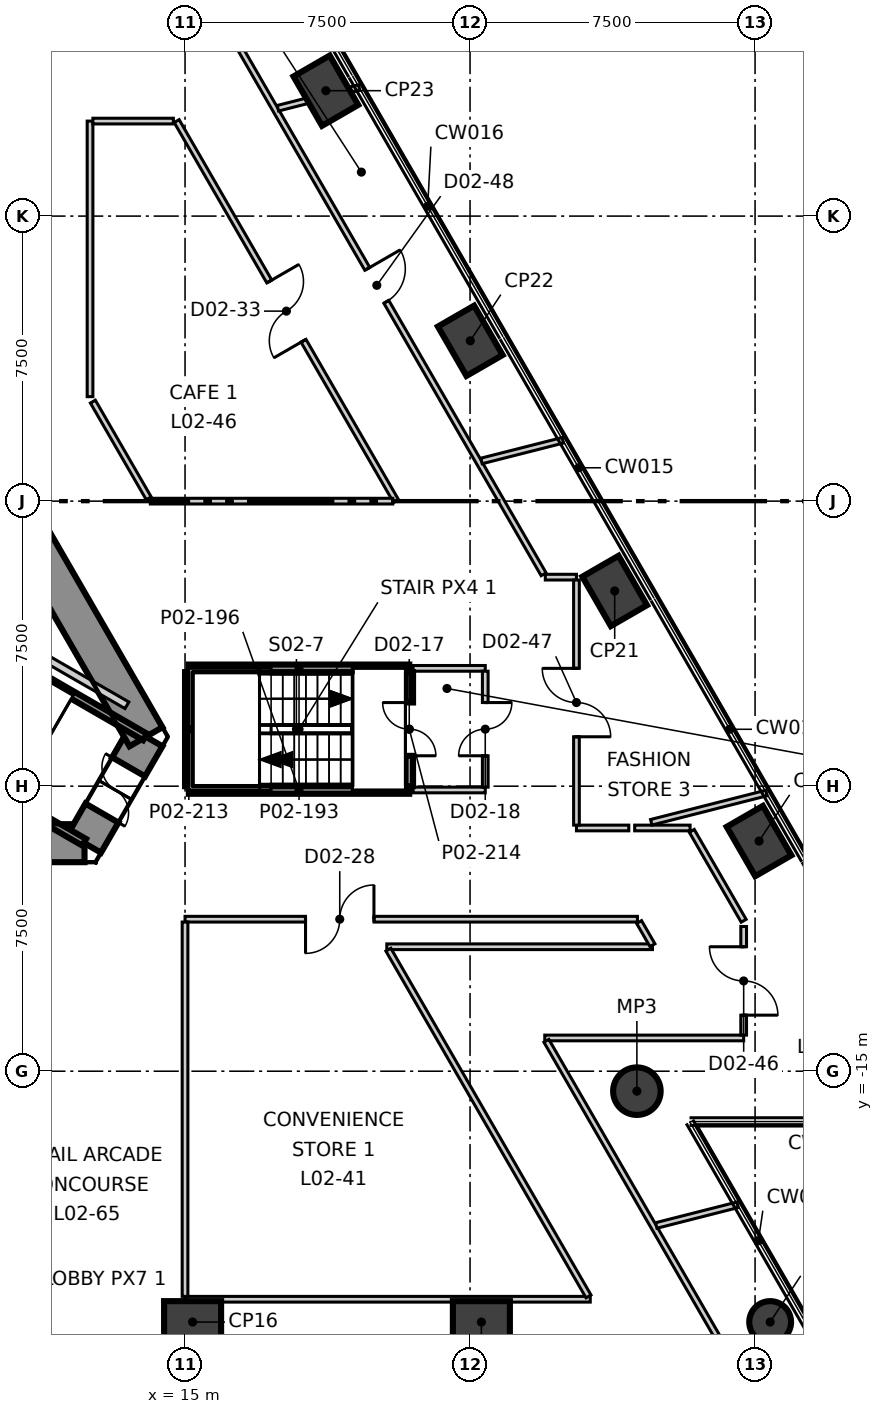
"""IFC4 building model, lengths in metres.
Left out: names, types, materials, properties, quantities, classifications, styles, units other than length and angle.
Written with IfcOpenShell. Run it as: python <this file> out.ifc"""

import sys

from ifc_helpers import new_model, si_unit, direction, frame, frame_2d, origin, origin_2d, place, context, subcontext, project, spatial, polyline, rectangle, circle, outline, extrude, element, fill, save


model = new_model("IFC4")
c1 = context("Model", 3, precision=1e-05, world=origin(), true_north=direction((0.0, 1.0)))
c2 = subcontext(c1, "Body", "Model", "MODEL_VIEW")
j1 = project(units=[si_unit("LENGTHUNIT", "METRE"), si_unit("PLANEANGLEUNIT", "RADIAN")], contexts=[c1])
p1 = place(None, origin())
s1 = spatial("IfcSite", under=j1, at=p1, CompositionType="ELEMENT")
p2 = place(p1, origin())
s2 = spatial("IfcBuilding", under=s1, at=p2, CompositionType="ELEMENT")
p3 = place(p2, frame((0.0, 0.0, 14.5)))
s3 = spatial("IfcBuildingStorey", under=s2, at=p3, CompositionType="ELEMENT", Elevation=14.5)
p4 = place(p3, frame((-12.355, -9.0, -0.4), z_axis=(0.0, 0.0, 1.0), x_axis=(1.0, 0.0, 0.0)))
e1 = element("IfcWall", 1, at=p4, inside=s3, PredefinedType="SHEAR", context=c2, shape_type="SweptSolid", body=[
    extrude(outline(polyline([(-0.289, -0.5), (1.656, -0.5), (3.601, -0.5), (5.547, -0.5), (7.492, -0.5), (9.437, -0.5), (11.382, -0.5), (13.328, -0.5), (15.273, -0.5), (17.218, -0.5), (19.163, -0.5), (21.109, -0.5), (23.054, -0.5), (24.999, -0.5), (24.422, 0.5), (22.566, 0.5), (20.709, 0.5), (18.853, 0.5), (16.996, 0.5), (15.14, 0.5), (13.283, 0.5), (11.427, 0.5), (9.57, 0.5), (7.714, 0.5), (5.857, 0.5), (4.001, 0.5), (2.145, 0.5), (0.288, 0.5), (-0.289, -0.5)])), origin(), (0.0, 0.0, 1.0), 5.4),
])
p5 = place(p3, frame((12.355, -9.0, -0.4), z_axis=(0.0, 0.0, 1.0), x_axis=(0.500077567175, 0.865980615723, 0.0)))
e2 = element("IfcWall", 2, at=p5, inside=s3, PredefinedType="SHEAR", context=c2, shape_type="SweptSolid", body=[
    extrude(outline(polyline([(-0.288, -0.5), (1.617, -0.5), (3.522, -0.5), (2.945, 0.5), (1.617, 0.5), (0.289, 0.499), (-0.288, -0.5)])), origin(), (0.0, 0.0, 1.0), 5.4),
])
p6 = place(p5, frame((0.917, 0.0, 0.4)))
e3 = element("IfcOpeningElement", 3, at=p6, cuts=e2, PredefinedType="OPENING", context=c2, shape_type="SweptSolid", body=[
    extrude(rectangle(XDim=1.4, YDim=2.1, at=frame_2d((0.7, 1.05))), frame((0.0, 0.51, 0.0), z_axis=(0.0, -1.0, 0.0), x_axis=(1.0, 0.0, 0.0)), (0.0, 0.0, 1.0), 1.02),
])
p7 = place(p3, frame((13.972, -6.2, -0.4), z_axis=(0.0, 0.0, 1.0), x_axis=(-0.499992141631, 0.866029940768, 0.0)))
e4 = element("IfcWall", 4, at=p7, inside=s3, PredefinedType="SHEAR", context=c2, shape_type="SweptSolid", body=[
    extrude(outline(polyline([(-0.288, -0.5), (1.657, -0.5), (3.602, -0.5), (5.547, -0.5), (7.493, -0.5), (9.438, -0.5), (11.383, -0.5), (13.328, -0.5), (15.273, -0.5), (17.218, -0.499), (19.164, -0.499), (21.109, -0.499), (23.054, -0.499), (24.999, -0.499), (24.422, 0.5), (22.566, 0.5), (20.709, 0.5), (18.853, 0.5), (16.996, 0.5), (15.14, 0.5), (13.283, 0.5), (11.427, 0.5), (9.57, 0.5), (7.714, 0.5), (5.857, 0.5), (4.001, 0.5), (2.145, 0.5), (0.288, 0.5), (-0.288, -0.5)])), origin(), (0.0, 0.0, 1.0), 5.4),
])
p8 = place(p7, frame((11.455, 0.0, 0.4)))
e5 = element("IfcOpeningElement", 5, at=p8, cuts=e4, PredefinedType="OPENING", context=c2, shape_type="SweptSolid", body=[
    extrude(rectangle(XDim=1.8, YDim=2.1, at=frame_2d((0.9, 1.05))), frame((0.0, 0.51, 0.0), z_axis=(0.0, -1.0, 0.0), x_axis=(1.0, 0.0, 0.0)), (0.0, 0.0, 1.0), 1.02),
])
for number, where, z_axis, x_axis in (
    (6, (15.199, -21.6, -0.4), (0.0, 0.0, 1.0), (1.0, 0.0, 0.0)),
    (7, (22.798, -21.6, -0.4), (0.0, 0.0, 1.0), (1.0, 0.0, 0.0)),
):
    element("IfcColumn", number, at=place(p3, frame(where, z_axis=z_axis, x_axis=x_axis)), inside=s3, PredefinedType="COLUMN", context=c2, shape_type="SweptSolid", body=[
        extrude(rectangle(XDim=1.5, YDim=1.1, at=origin_2d()), origin(), (0.0, 0.0, 1.0), 5.4),
    ])
p9 = place(p3, frame((30.397, -21.6, -0.4), z_axis=(0.0, 0.0, 1.0), x_axis=(1.0, 0.0, 0.0)))
e8 = element("IfcColumn", 8, at=p9, inside=s3, PredefinedType="COLUMN", context=c2, shape_type="SweptSolid", body=[
    extrude(circle(Radius=0.55, at=origin_2d()), origin(), (0.0, 0.0, 1.0), 5.4),
])
for number, where, z_axis, x_axis in (
    (9, (30.105, -8.944, -0.4), (0.0, 0.0, 1.0), (-0.5, 0.866, 0.0)),
    (10, (26.306, -2.363, -0.4), (0.0, 0.0, 1.0), (-0.5, 0.866, 0.0)),
    (11, (22.506, 4.219, -0.4), (0.0, 0.0, 1.0), (-0.5, 0.866, 0.0)),
    (12, (18.706, 10.8, -0.4), (0.0, 0.0, 1.0), (-0.5, 0.866, 0.0)),
):
    element("IfcColumn", number, at=place(p3, frame(where, z_axis=z_axis, x_axis=x_axis)), inside=s3, PredefinedType="COLUMN", context=c2, shape_type="SweptSolid", body=[
        extrude(rectangle(XDim=1.5, YDim=1.1, at=origin_2d()), origin(), (0.0, 0.0, 1.0), 5.4),
    ])
p10 = place(p3, frame((26.89, -15.525, -0.4), z_axis=(0.0, 0.0, 1.0), x_axis=(1.0, 0.0, 0.0)))
e13 = element("IfcColumn", 13, at=p10, inside=s3, PredefinedType="COLUMN", context=c2, shape_type="SweptSolid", body=[
    extrude(circle(Radius=0.625, at=origin_2d()), origin(), (0.0, 0.0, 1.0), 5.4),
])
for number, where, z_axis, x_axis in (
    (14, (21.0, -7.6, 0.0), (0.0, 0.0, 1.0), (1.0, 0.0, 0.0)),
    (15, (21.0, -4.4, 0.0), (0.0, 0.0, 1.0), (1.0, 0.0, 0.0)),
):
    element("IfcWall", number, at=place(p3, frame(where, z_axis=z_axis, x_axis=x_axis)), inside=s3, PredefinedType="PARTITIONING", context=c2, shape_type="SweptSolid", body=[
        extrude(rectangle(XDim=1.9, YDim=0.15, at=frame_2d((0.95, 0.0))), origin(), (0.0, 0.0, 1.0), 5.0),
    ])
p11 = place(p3, frame((22.9, -7.525, 0.0), z_axis=(0.0, 0.0, 1.0), x_axis=(0.0, 1.0, 0.0)))
e16 = element("IfcWall", 16, at=p11, inside=s3, PredefinedType="PARTITIONING", context=c2, shape_type="SweptSolid", body=[
    extrude(rectangle(XDim=3.05, YDim=0.15, at=frame_2d((1.525, 0.0))), origin(), (0.0, 0.0, 1.0), 5.0),
])
p12 = place(p11, frame((0.825, 0.0, 0.0)))
e17 = element("IfcOpeningElement", 17, at=p12, cuts=e16, PredefinedType="OPENING", context=c2, shape_type="SweptSolid", body=[
    extrude(rectangle(XDim=1.4, YDim=2.1, at=frame_2d((0.7, 1.05))), frame((0.0, 0.085, 0.0), z_axis=(0.0, -1.0, 0.0), x_axis=(1.0, 0.0, 0.0)), (0.0, 0.0, 1.0), 0.17),
])
p13 = place(p3, frame((25.3, -8.6, 0.0), z_axis=(0.0, 0.0, 1.0), x_axis=(1.0, 0.0, 0.0)))
e18 = element("IfcWall", 18, at=p13, inside=s3, PredefinedType="PARTITIONING", context=c2, shape_type="SweptSolid", body=[
    extrude(rectangle(XDim=1.377, YDim=0.15, at=frame_2d((0.688, 0.0))), origin(), (0.0, 0.0, 1.0), 5.0),
])
p14 = place(p3, frame((26.832, -8.6, 0.0), z_axis=(0.0, 0.0, 1.0), x_axis=(1.0, 0.0, 0.0)))
e19 = element("IfcWall", 19, at=p14, inside=s3, PredefinedType="PARTITIONING", context=c2, shape_type="SweptSolid", body=[
    extrude(rectangle(XDim=1.458, YDim=0.15, at=frame_2d((0.729, 0.0))), origin(), (0.0, 0.0, 1.0), 5.0),
])
p15 = place(p3, frame((24.466, -14.125, 0.0), z_axis=(0.0, 0.0, 1.0), x_axis=(1.0, 0.0, 0.0)))
e20 = element("IfcWall", 20, at=p15, inside=s3, PredefinedType="PARTITIONING", context=c2, shape_type="SweptSolid", body=[
    extrude(rectangle(XDim=5.234, YDim=0.15, at=frame_2d((2.617, 0.0))), origin(), (0.0, 0.0, 1.0), 5.0),
])
p16 = place(p3, frame((24.48, -2.0, 0.0), z_axis=(0.0, 0.0, 1.0), x_axis=(1.0, 0.0, 0.0)))
e21 = element("IfcWall", 21, at=p16, inside=s3, PredefinedType="PARTITIONING", context=c2, shape_type="SweptSolid", body=[
    extrude(rectangle(XDim=0.82, YDim=0.15, at=frame_2d((0.41, 0.0))), origin(), (0.0, 0.0, 1.0), 4.4),
])
p17 = place(p3, frame((16.166, 12.4, 0.0), z_axis=(0.0, 0.0, 1.0), x_axis=(0.499977560568, -0.866038358809, 0.0)))
e22 = element("IfcWall", 22, at=p17, inside=s3, PredefinedType="PARTITIONING", context=c2, shape_type="SweptSolid", body=[
    extrude(rectangle(XDim=16.541, YDim=0.15, at=frame_2d((8.271, 0.0))), origin(), (0.0, 0.0, 1.0), 5.0),
])
p18 = place(p17, frame((7.261, 0.0, 0.0)))
e23 = element("IfcOpeningElement", 23, at=p18, cuts=e22, PredefinedType="OPENING", context=c2, shape_type="SweptSolid", body=[
    extrude(rectangle(XDim=1.0, YDim=2.1, at=frame_2d((0.5, 1.05))), frame((0.0, 0.085, 0.0), z_axis=(0.0, -1.0, 0.0), x_axis=(1.0, 0.0, 0.0)), (0.0, 0.0, 1.0), 0.17),
])
p19 = place(p3, frame((28.334, -8.675, 0.0), z_axis=(0.0, 0.0, 1.0), x_axis=(0.499838457731, -0.86611865017, 0.0)))
e24 = element("IfcWall", 24, at=p19, inside=s3, PredefinedType="PARTITIONING", context=c2, shape_type="SweptSolid", body=[
    extrude(rectangle(XDim=2.733, YDim=0.15, at=frame_2d((1.366, 0.0))), origin(), (0.0, 0.0, 1.0), 5.0),
])
p20 = place(p3, frame((17.443, 10.338, 0.0), z_axis=(0.0, 0.0, 1.0), x_axis=(0.969125534663, 0.246567836636, 0.0)))
e25 = element("IfcWall", 25, at=p20, inside=s3, PredefinedType="PARTITIONING", context=c2, shape_type="SweptSolid", body=[
    extrude(rectangle(XDim=2.207, YDim=0.15, at=frame_2d((1.104, 0.0))), origin(), (0.0, 0.0, 1.0), 5.0),
])
p21 = place(p3, frame((22.801, 1.057, 0.0), z_axis=(0.0, 0.0, 1.0), x_axis=(0.969152417799, 0.246462149375, 0.0)))
e26 = element("IfcWall", 26, at=p21, inside=s3, PredefinedType="PARTITIONING", context=c2, shape_type="SweptSolid", body=[
    extrude(rectangle(XDim=2.208, YDim=0.15, at=frame_2d((1.104, 0.0))), origin(), (0.0, 0.0, 1.0), 5.0),
])
p22 = place(p3, frame((27.268, -8.45, 0.0), z_axis=(0.0, 0.0, 1.0), x_axis=(0.969212436765, 0.246226018974, 0.0)))
e27 = element("IfcWall", 27, at=p22, inside=s3, PredefinedType="PARTITIONING", context=c2, shape_type="SweptSolid", body=[
    extrude(rectangle(XDim=3.127, YDim=0.15, at=frame_2d((1.563, 0.0))), origin(), (0.0, 0.0, 1.0), 5.0),
])
p23 = place(p3, frame((25.3, -8.525, 0.0), z_axis=(0.0, 0.0, 1.0), x_axis=(0.0, 1.0, 0.0)))
e28 = element("IfcWall", 28, at=p23, inside=s3, PredefinedType="PARTITIONING", context=c2, shape_type="SweptSolid", body=[
    extrude(rectangle(XDim=6.45, YDim=0.15, at=frame_2d((3.225, 0.0))), origin(), (0.0, 0.0, 1.0), 5.0),
])
p24 = place(p23, frame((2.325, 0.0, 0.0)))
e29 = element("IfcOpeningElement", 29, at=p24, cuts=e28, PredefinedType="OPENING", context=c2, shape_type="SweptSolid", body=[
    extrude(rectangle(XDim=1.8, YDim=2.1, at=frame_2d((0.9, 1.05))), frame((0.0, 0.085, 0.0), z_axis=(0.0, -1.0, 0.0), x_axis=(1.0, 0.0, 0.0)), (0.0, 0.0, 1.0), 0.17),
])
p25 = place(p3, frame((29.7, -14.05, 0.0), z_axis=(0.0, 0.0, 1.0), x_axis=(0.0, 1.0, 0.0)))
e30 = element("IfcWall", 30, at=p25, inside=s3, PredefinedType="PARTITIONING", context=c2, shape_type="SweptSolid", body=[
    extrude(rectangle(XDim=2.858, YDim=0.15, at=frame_2d((1.429, 0.0))), origin(), (0.0, 0.0, 1.0), 5.0),
])
p26 = place(p25, frame((0.525, 0.0, 0.0)))
e31 = element("IfcOpeningElement", 31, at=p26, cuts=e30, PredefinedType="OPENING", context=c2, shape_type="SweptSolid", body=[
    extrude(rectangle(XDim=1.8, YDim=2.1, at=frame_2d((0.9, 1.05))), frame((0.0, 0.085, 0.0), z_axis=(0.0, -1.0, 0.0), x_axis=(1.0, 0.0, 0.0)), (0.0, 0.0, 1.0), 0.17),
])
p27 = place(p3, frame((24.509, -14.2, 0.0), z_axis=(0.0, 0.0, 1.0), x_axis=(0.499960629411, -0.866048133212, 0.0)))
e32 = element("IfcWall", 32, at=p27, inside=s3, PredefinedType="PARTITIONING", context=c2, shape_type="SweptSolid", body=[
    extrude(rectangle(XDim=9.613, YDim=0.15, at=frame_2d((4.806, 0.0))), origin(), (0.0, 0.0, 1.0), 5.0),
])
p28 = place(p3, frame((27.4, -19.059, 0.0), z_axis=(0.0, 0.0, 1.0), x_axis=(0.969159133182, 0.246435741258, 0.0)))
e33 = element("IfcWall", 33, at=p28, inside=s3, PredefinedType="PARTITIONING", context=c2, shape_type="SweptSolid", body=[
    extrude(rectangle(XDim=2.208, YDim=0.15, at=frame_2d((1.104, 0.0))), origin(), (0.0, 0.0, 1.0), 5.0),
])
p29 = place(p3, frame((15.0, -11.0, 0.0), z_axis=(0.0, 0.0, 1.0), x_axis=(1.0, 0.0, 0.0)))
e34 = element("IfcWall", 34, at=p29, inside=s3, PredefinedType="PARTITIONING", context=c2, shape_type="SweptSolid", body=[
    extrude(rectangle(XDim=11.905, YDim=0.15, at=frame_2d((5.953, 0.0))), origin(), (0.0, 0.0, 1.0), 5.0),
])
p30 = place(p29, frame((3.171, 0.0, 0.0)))
e35 = element("IfcOpeningElement", 35, at=p30, cuts=e34, PredefinedType="OPENING", context=c2, shape_type="SweptSolid", body=[
    extrude(rectangle(XDim=1.8, YDim=2.1, at=frame_2d((0.9, 1.05))), frame((0.0, 0.085, 0.0), z_axis=(0.0, -1.0, 0.0), x_axis=(1.0, 0.0, 0.0)), (0.0, 0.0, 1.0), 0.17),
])
p31 = place(p3, frame((15.0, -21.0, 0.0), z_axis=(0.0, 0.0, 1.0), x_axis=(1.0, 0.0, 0.0)))
e36 = element("IfcWall", 36, at=p31, inside=s3, PredefinedType="PARTITIONING", context=c2, shape_type="SweptSolid", body=[
    extrude(rectangle(XDim=10.663, YDim=0.15, at=frame_2d((5.332, 0.0))), origin(), (0.0, 0.0, 1.0), 5.0),
])
p32 = place(p3, frame((20.309, -11.725, 0.0), z_axis=(0.0, 0.0, 1.0), x_axis=(1.0, 0.0, 0.0)))
e37 = element("IfcWall", 37, at=p32, inside=s3, PredefinedType="PARTITIONING", context=c2, shape_type="SweptSolid", body=[
    extrude(rectangle(XDim=6.991, YDim=0.15, at=frame_2d((3.496, 0.0))), origin(), (0.0, 0.0, 1.0), 5.0),
])
p33 = place(p3, frame((20.35, -11.801, 0.0), z_axis=(0.0, 0.0, 1.0), x_axis=(0.499894962398, -0.86608603878, 0.0)))
e38 = element("IfcWall", 38, at=p33, inside=s3, PredefinedType="PARTITIONING", context=c2, shape_type="SweptSolid", body=[
    extrude(rectangle(XDim=10.536, YDim=0.15, at=frame_2d((5.268, 0.0))), origin(), (0.0, 0.0, 1.0), 5.0),
])
p34 = place(p3, frame((14.78, 10.0, 0.0), z_axis=(0.0, 0.0, 1.0), x_axis=(0.500027479704, -0.866009537788, 0.0)))
e39 = element("IfcWall", 39, at=p34, inside=s3, PredefinedType="PARTITIONING", context=c2, shape_type="SweptSolid", body=[
    extrude(rectangle(XDim=11.547, YDim=0.15, at=frame_2d((5.773, 0.0))), origin(), (0.0, 0.0, 1.0), 5.0),
])
p35 = place(p34, frame((4.874, 0.0, 0.0)))
e40 = element("IfcOpeningElement", 40, at=p35, cuts=e39, PredefinedType="OPENING", context=c2, shape_type="SweptSolid", body=[
    extrude(rectangle(XDim=1.8, YDim=2.1, at=frame_2d((0.9, 1.05))), frame((0.0, 0.085, 0.0), z_axis=(0.0, -1.0, 0.0), x_axis=(1.0, 0.0, 0.0)), (0.0, 0.0, 1.0), 0.17),
])
p36 = place(p3, frame((26.948, -11.075, 0.0), z_axis=(0.0, 0.0, 1.0), x_axis=(0.499792463624, -0.866145191815, 0.0)))
e41 = element("IfcWall", 41, at=p36, inside=s3, PredefinedType="PARTITIONING", context=c2, shape_type="SweptSolid", body=[
    extrude(rectangle(XDim=0.704, YDim=0.15, at=frame_2d((0.352, 0.0))), origin(), (0.0, 0.0, 1.0), 5.0),
])
p37 = place(p3, frame((12.5, 2.749, 0.0), z_axis=(0.0, 0.0, 1.0), x_axis=(0.0, 1.0, 0.0)))
e42 = element("IfcWall", 42, at=p37, inside=s3, PredefinedType="PARTITIONING", context=c2, shape_type="SweptSolid", body=[
    extrude(rectangle(XDim=7.251, YDim=0.15, at=frame_2d((3.625, 0.0))), origin(), (0.0, 0.0, 1.0), 5.0),
])
p38 = place(p3, frame((12.575, 10.0, 0.0), z_axis=(0.0, 0.0, 1.0), x_axis=(1.0, 0.0, 0.0)))
e43 = element("IfcWall", 43, at=p38, inside=s3, PredefinedType="PARTITIONING", context=c2, shape_type="SweptSolid", body=[
    extrude(rectangle(XDim=2.118, YDim=0.15, at=frame_2d((1.059, 0.0))), origin(), (0.0, 0.0, 1.0), 5.0),
])
p39 = place(p3, frame((14.087, 0.0, 0.0), z_axis=(0.0, 0.0, 1.0), x_axis=(1.0, 0.0, 0.0)))
e44 = element("IfcWall", 44, at=p39, inside=s3, PredefinedType="PARTITIONING", context=c2, shape_type="SweptSolid", body=[
    extrude(rectangle(XDim=6.38, YDim=0.15, at=frame_2d((3.19, 0.0))), origin(), (0.0, 0.0, 1.0), 5.0),
])
p40 = place(p3, frame((12.575, 2.619, 0.0), z_axis=(0.0, 0.0, 1.0), x_axis=(0.500062965414, -0.865989047634, 0.0)))
e45 = element("IfcWall", 45, at=p40, inside=s3, PredefinedType="PARTITIONING", context=c2, shape_type="SweptSolid", body=[
    extrude(rectangle(XDim=2.938, YDim=0.15, at=frame_2d((1.469, 0.0))), origin(), (0.0, 0.0, 1.0), 5.0),
])
p41 = place(p3, frame((15.0, -20.925, 0.0), z_axis=(0.0, 0.0, 1.0), x_axis=(0.0, 1.0, 0.0)))
e46 = element("IfcWall", 46, at=p41, inside=s3, PredefinedType="PARTITIONING", context=c2, shape_type="SweptSolid", body=[
    extrude(rectangle(XDim=9.85, YDim=0.15, at=frame_2d((4.925, 0.0))), origin(), (0.0, 0.0, 1.0), 5.0),
])
p42 = place(p3, frame((6.983, -1.626, 0.0), z_axis=(0.0, 0.0, 1.0), x_axis=(0.866012469592, -0.50002240201, 0.0)))
e47 = element("IfcWall", 47, at=p42, inside=s3, PredefinedType="SOLIDWALL", context=c2, shape_type="SweptSolid", body=[
    extrude(rectangle(XDim=7.492, YDim=0.2, at=frame_2d((3.746, 0.0))), origin(), (0.0, 0.0, 1.0), 5.0),
])
p43 = place(p3, frame((4.929, -4.693, 0.0), z_axis=(0.0, 0.0, 1.0), x_axis=(0.865987152174, -0.50006624788, 0.0)))
e48 = element("IfcWall", 48, at=p43, inside=s3, PredefinedType="SOLIDWALL", context=c2, shape_type="SweptSolid", body=[
    extrude(rectangle(XDim=8.565, YDim=0.2, at=frame_2d((4.282, 0.0))), origin(), (0.0, 0.0, 1.0), 5.0),
])
p44 = place(p3, frame((6.529, -1.922, 0.0), z_axis=(0.0, 0.0, 1.0), x_axis=(0.866036527536, -0.499980732602, 0.0)))
e49 = element("IfcWall", 49, at=p44, inside=s3, PredefinedType="SOLIDWALL", context=c2, shape_type="SweptSolid", body=[
    extrude(rectangle(XDim=8.564, YDim=0.2, at=frame_2d((4.282, 0.0))), origin(), (0.0, 0.0, 1.0), 5.0),
])
p45 = place(p3, frame((15.1, -4.4, 0.0), z_axis=(0.0, 0.0, 1.0), x_axis=(1.0, 0.0, 0.0)))
e50 = element("IfcWall", 50, at=p45, inside=s3, PredefinedType="SOLIDWALL", context=c2, shape_type="SweptSolid", body=[
    extrude(rectangle(XDim=5.8, YDim=0.2, at=frame_2d((2.9, 0.0))), origin(), (0.0, 0.0, 1.0), 5.0),
])
p46 = place(p3, frame((15.1, -7.6, 0.0), z_axis=(0.0, 0.0, 1.0), x_axis=(1.0, 0.0, 0.0)))
e51 = element("IfcWall", 51, at=p46, inside=s3, PredefinedType="SOLIDWALL", context=c2, shape_type="SweptSolid", body=[
    extrude(rectangle(XDim=5.798, YDim=0.2, at=frame_2d((2.899, 0.0))), origin(), (0.0, 0.0, 1.0), 5.0),
])
p47 = place(p3, frame((15.1, -7.5, 0.0), z_axis=(0.0, 0.0, 1.0), x_axis=(0.0, 1.0, 0.0)))
e52 = element("IfcWall", 52, at=p47, inside=s3, PredefinedType="SOLIDWALL", context=c2, shape_type="SweptSolid", body=[
    extrude(rectangle(XDim=3.0, YDim=0.2, at=frame_2d((1.5, 0.0))), origin(), (0.0, 0.0, 1.0), 5.0),
])
p48 = place(p3, frame((20.9, -7.5, 0.0), z_axis=(0.0, 0.0, 1.0), x_axis=(0.0, 1.0, 0.0)))
e53 = element("IfcWall", 53, at=p48, inside=s3, PredefinedType="SOLIDWALL", context=c2, shape_type="SweptSolid", body=[
    extrude(rectangle(XDim=3.0, YDim=0.2, at=frame_2d((1.5, 0.0))), origin(), (0.0, 0.0, 1.0), 5.0),
])
p49 = place(p48, frame((0.8, 0.0, 0.0)))
e54 = element("IfcOpeningElement", 54, at=p49, cuts=e53, PredefinedType="OPENING", context=c2, shape_type="SweptSolid", body=[
    extrude(rectangle(XDim=1.4, YDim=2.1, at=frame_2d((0.7, 1.05))), frame((0.0, 0.11, 0.0), z_axis=(0.0, -1.0, 0.0), x_axis=(1.0, 0.0, 0.0)), (0.0, 0.0, 1.0), 0.22),
])
p50 = place(p49, origin())
e55 = element("IfcDoor", 55, at=p50, inside=s3, OperationType="DOUBLE_DOOR_SINGLE_SWING", PredefinedType="DOOR", context=c2, shape_type="SweptSolid", body=[
    extrude(rectangle(XDim=1.4, YDim=2.1, at=frame_2d((0.7, 1.05))), frame((0.0, 0.025, 0.0), z_axis=(0.0, -1.0, 0.0), x_axis=(1.0, 0.0, 0.0)), (0.0, 0.0, 1.0), 0.05),
])
fill(e54, e55)
p51 = place(p12, origin())
e56 = element("IfcDoor", 56, at=p51, inside=s3, OperationType="DOUBLE_DOOR_SINGLE_SWING", PredefinedType="DOOR", context=c2, shape_type="SweptSolid", body=[
    extrude(rectangle(XDim=1.4, YDim=2.1, at=frame_2d((0.7, 1.05))), frame((0.0, 0.025, 0.0), z_axis=(0.0, -1.0, 0.0), x_axis=(1.0, 0.0, 0.0)), (0.0, 0.0, 1.0), 0.05),
])
fill(e17, e56)
p52 = place(p30, origin())
e57 = element("IfcDoor", 57, at=p52, inside=s3, OperationType="DOUBLE_DOOR_SINGLE_SWING", PredefinedType="DOOR", context=c2, shape_type="SweptSolid", body=[
    extrude(rectangle(XDim=1.8, YDim=2.1, at=frame_2d((0.9, 1.05))), frame((0.0, 0.025, 0.0), z_axis=(0.0, -1.0, 0.0), x_axis=(1.0, 0.0, 0.0)), (0.0, 0.0, 1.0), 0.05),
])
fill(e35, e57)
p53 = place(p35, origin())
e58 = element("IfcDoor", 58, at=p53, inside=s3, OperationType="DOUBLE_DOOR_SINGLE_SWING", PredefinedType="DOOR", context=c2, shape_type="SweptSolid", body=[
    extrude(rectangle(XDim=1.8, YDim=2.1, at=frame_2d((0.9, 1.05))), frame((0.0, 0.025, 0.0), z_axis=(0.0, -1.0, 0.0), x_axis=(1.0, 0.0, 0.0)), (0.0, 0.0, 1.0), 0.05),
])
fill(e40, e58)
p54 = place(p26, origin())
e59 = element("IfcDoor", 59, at=p54, inside=s3, OperationType="DOUBLE_DOOR_SINGLE_SWING", PredefinedType="DOOR", context=c2, shape_type="SweptSolid", body=[
    extrude(rectangle(XDim=1.8, YDim=2.1, at=frame_2d((0.9, 1.05))), frame((0.0, 0.025, 0.0), z_axis=(0.0, -1.0, 0.0), x_axis=(1.0, 0.0, 0.0)), (0.0, 0.0, 1.0), 0.05),
])
fill(e31, e59)
p55 = place(p24, origin())
e60 = element("IfcDoor", 60, at=p55, inside=s3, OperationType="DOUBLE_DOOR_SINGLE_SWING", PredefinedType="DOOR", context=c2, shape_type="SweptSolid", body=[
    extrude(rectangle(XDim=1.8, YDim=2.1, at=frame_2d((0.9, 1.05))), frame((0.0, 0.025, 0.0), z_axis=(0.0, -1.0, 0.0), x_axis=(1.0, 0.0, 0.0)), (0.0, 0.0, 1.0), 0.05),
])
fill(e29, e60)
p56 = place(p18, origin())
e61 = element("IfcDoor", 61, at=p56, inside=s3, OperationType="SINGLE_SWING_RIGHT", PredefinedType="DOOR", context=c2, shape_type="SweptSolid", body=[
    extrude(rectangle(XDim=1.0, YDim=2.1, at=frame_2d((0.5, 1.05))), frame((0.0, 0.025, 0.0), z_axis=(0.0, -1.0, 0.0), x_axis=(1.0, 0.0, 0.0)), (0.0, 0.0, 1.0), 0.05),
])
fill(e23, e61)
p57 = place(p6, origin())
e62 = element("IfcDoor", 62, at=p57, inside=s3, OperationType="DOUBLE_DOOR_SINGLE_SWING", PredefinedType="DOOR", context=c2, shape_type="SweptSolid", body=[
    extrude(rectangle(XDim=1.4, YDim=2.1, at=frame_2d((0.7, 1.05))), frame((0.0, 0.025, 0.0), z_axis=(0.0, -1.0, 0.0), x_axis=(1.0, 0.0, 0.0)), (0.0, 0.0, 1.0), 0.05),
])
fill(e3, e62)
save(model, sys.argv[1])
